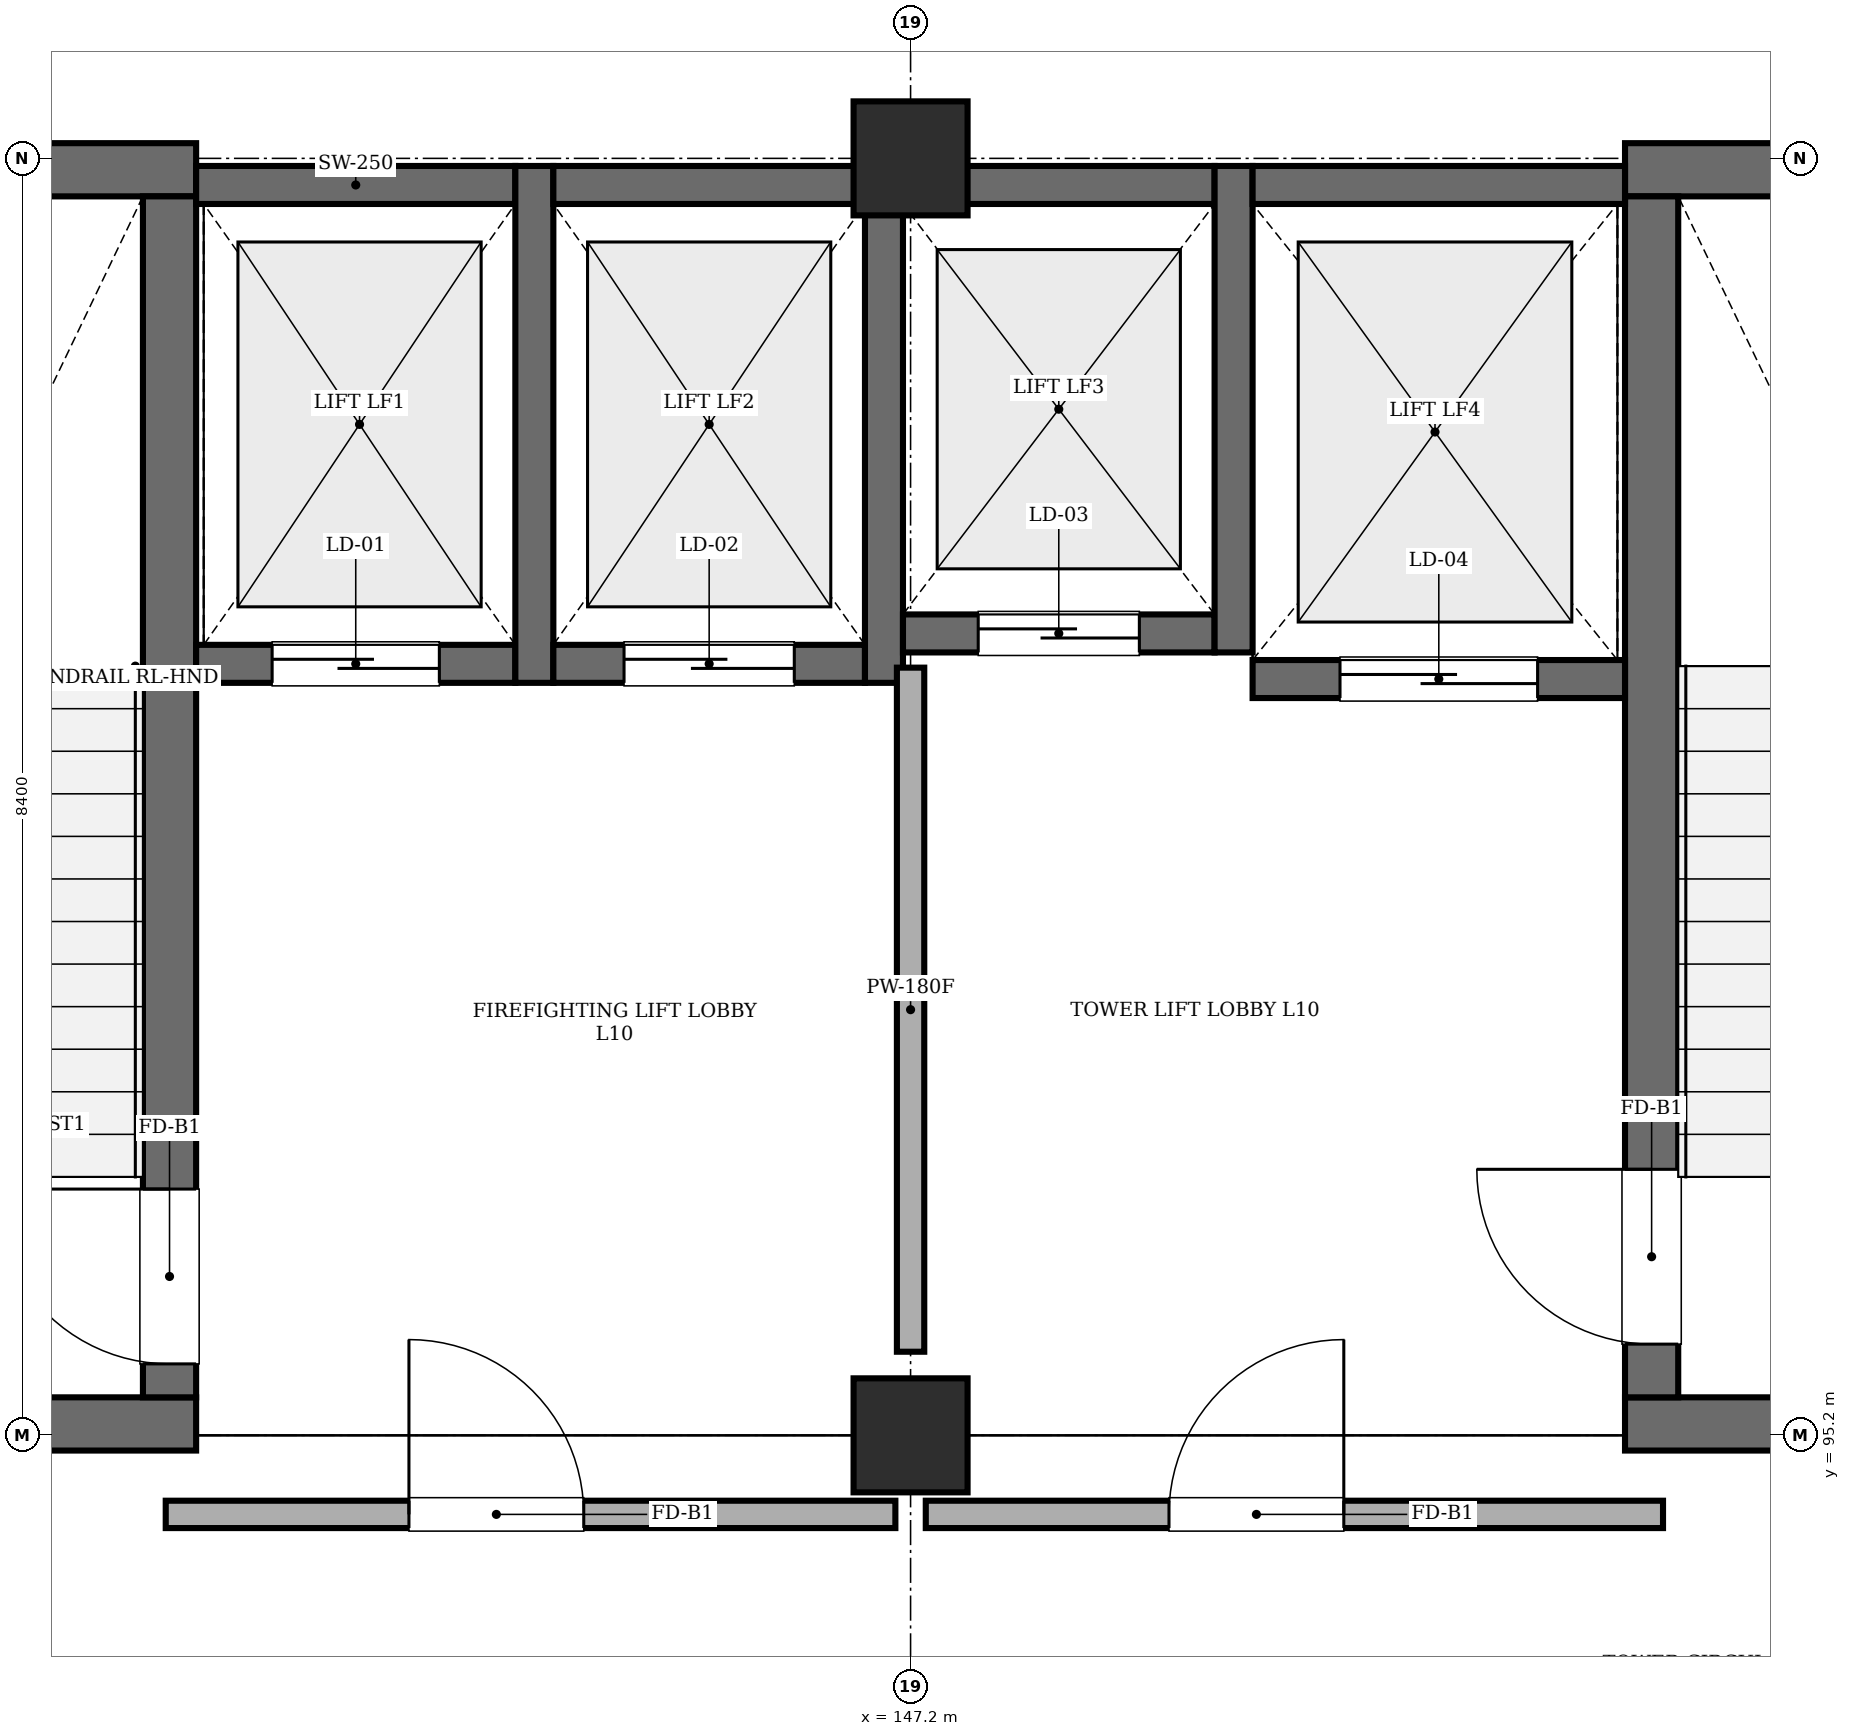
"""IFC4 building model, lengths in metres.
Left out: names, types, materials, properties, quantities, classifications, styles, units other than length and angle.
Written with IfcOpenShell. Run it as: python <this file> out.ifc"""

import sys

from ifc_helpers import new_model, si_unit, direction, frame, frame_2d, origin, origin_2d, place, context, subcontext, project, spatial, rectangle, extrude, element, fill, save


model = new_model("IFC4")
c1 = context("Model", 3, precision=1e-05, world=origin(), true_north=direction((0.0, 1.0)))
c2 = subcontext(c1, "Body", "Model", "MODEL_VIEW")
j1 = project(units=[si_unit("LENGTHUNIT", "METRE"), si_unit("PLANEANGLEUNIT", "RADIAN")], contexts=[c1])
p1 = place(None, origin())
s1 = spatial("IfcSite", under=j1, at=p1, CompositionType="ELEMENT")
p2 = place(p1, origin())
s2 = spatial("IfcBuilding", under=s1, at=p2, CompositionType="ELEMENT")
p3 = place(p2, frame((0.0, 0.0, 40.2)))
s3 = spatial("IfcBuildingStorey", under=s2, at=p3, CompositionType="ELEMENT", Elevation=40.2)
for number, where, z_axis, x_axis in (
    (1, (147.2, 95.2, 0.0), (0.0, 0.0, 1.0), (1.0, 0.0, 0.0)),
    (2, (147.2, 103.6, 0.0), (0.0, 0.0, 1.0), (1.0, 0.0, 0.0)),
):
    element("IfcColumn", number, at=place(p3, frame(where, z_axis=z_axis, x_axis=x_axis)), inside=s3, PredefinedType="COLUMN", context=c2, shape_type="SweptSolid", body=[
        extrude(rectangle(XDim=0.75, YDim=0.75, at=origin_2d()), origin(), (0.0, 0.0, 1.0), 4.0),
    ])
for number, where, z_axis, x_axis in (
    (3, (138.7, 95.275, 0.0), (0.0, 0.0, 1.0), (1.0, 0.0, 0.0)),
    (4, (138.7, 103.525, 0.0), (0.0, 0.0, 1.0), (1.0, 0.0, 0.0)),
):
    element("IfcWall", number, at=place(p3, frame(where, z_axis=z_axis, x_axis=x_axis)), inside=s3, PredefinedType="SHEAR", context=c2, shape_type="SweptSolid", body=[
        extrude(rectangle(XDim=3.8, YDim=0.35, at=frame_2d((1.9, 0.0))), origin(), (0.0, 0.0, 1.0), 4.0),
    ])
p4 = place(p3, frame((142.325, 95.45, 0.0), z_axis=(0.0, 0.0, 1.0), x_axis=(0.0, 1.0, 0.0)))
e5 = element("IfcWall", 5, at=p4, inside=s3, PredefinedType="SHEAR", context=c2, shape_type="SweptSolid", body=[
    extrude(rectangle(XDim=7.9, YDim=0.35, at=frame_2d((3.95, 0.0))), origin(), (0.0, 0.0, 1.0), 4.0),
])
p5 = place(p4, frame((0.22, 0.0, 0.0)))
e6 = element("IfcOpeningElement", 6, at=p5, cuts=e5, PredefinedType="OPENING", context=c2, shape_type="SweptSolid", body=[
    extrude(rectangle(XDim=1.15, YDim=2.15, at=frame_2d((0.575, 1.075))), frame((0.0, 0.185, 0.0), z_axis=(0.0, -1.0, 0.0), x_axis=(1.0, 0.0, 0.0)), (0.0, 0.0, 1.0), 0.37),
])
for number, where, z_axis, x_axis in (
    (7, (151.9, 95.275, 0.0), (0.0, 0.0, 1.0), (1.0, 0.0, 0.0)),
    (8, (151.9, 103.525, 0.0), (0.0, 0.0, 1.0), (1.0, 0.0, 0.0)),
):
    element("IfcWall", number, at=place(p3, frame(where, z_axis=z_axis, x_axis=x_axis)), inside=s3, PredefinedType="SHEAR", context=c2, shape_type="SweptSolid", body=[
        extrude(rectangle(XDim=3.8, YDim=0.35, at=frame_2d((1.9, 0.0))), origin(), (0.0, 0.0, 1.0), 4.0),
    ])
p6 = place(p3, frame((152.075, 95.45, 0.0), z_axis=(0.0, 0.0, 1.0), x_axis=(0.0, 1.0, 0.0)))
e9 = element("IfcWall", 9, at=p6, inside=s3, PredefinedType="SHEAR", context=c2, shape_type="SweptSolid", body=[
    extrude(rectangle(XDim=7.9, YDim=0.35, at=frame_2d((3.95, 0.0))), origin(), (0.0, 0.0, 1.0), 4.0),
])
p7 = place(p6, frame((0.35, 0.0, 0.0)))
e10 = element("IfcOpeningElement", 10, at=p7, cuts=e9, PredefinedType="OPENING", context=c2, shape_type="SweptSolid", body=[
    extrude(rectangle(XDim=1.15, YDim=2.15, at=frame_2d((0.575, 1.075))), frame((0.0, 0.185, 0.0), z_axis=(0.0, -1.0, 0.0), x_axis=(1.0, 0.0, 0.0)), (0.0, 0.0, 1.0), 0.37),
])
p8 = place(p3, frame((142.5, 100.275, 0.0), z_axis=(0.0, 0.0, 1.0), x_axis=(1.0, 0.0, 0.0)))
e11 = element("IfcWall", 11, at=p8, inside=s3, PredefinedType="SHEAR", context=c2, shape_type="SweptSolid", body=[
    extrude(rectangle(XDim=2.1, YDim=0.25, at=frame_2d((1.05, 0.0))), origin(), (0.0, 0.0, 1.0), 4.0),
])
p9 = place(p8, frame((0.5, 0.0, 0.0)))
e12 = element("IfcOpeningElement", 12, at=p9, cuts=e11, PredefinedType="OPENING", context=c2, shape_type="SweptSolid", body=[
    extrude(rectangle(XDim=1.1, YDim=2.15, at=frame_2d((0.55, 1.075))), frame((0.0, 0.135, 0.0), z_axis=(0.0, -1.0, 0.0), x_axis=(1.0, 0.0, 0.0)), (0.0, 0.0, 1.0), 0.27),
])
p10 = place(p3, frame((142.5, 103.425, 0.0), z_axis=(0.0, 0.0, 1.0), x_axis=(1.0, 0.0, 0.0)))
e13 = element("IfcWall", 13, at=p10, inside=s3, PredefinedType="SHEAR", context=c2, shape_type="SweptSolid", body=[
    extrude(rectangle(XDim=2.1, YDim=0.25, at=frame_2d((1.05, 0.0))), origin(), (0.0, 0.0, 1.0), 4.0),
])
p11 = place(p3, frame((144.725, 100.15, 0.0), z_axis=(0.0, 0.0, 1.0), x_axis=(0.0, 1.0, 0.0)))
e14 = element("IfcWall", 14, at=p11, inside=s3, PredefinedType="SHEAR", context=c2, shape_type="SweptSolid", body=[
    extrude(rectangle(XDim=3.4, YDim=0.25, at=frame_2d((1.7, 0.0))), origin(), (0.0, 0.0, 1.0), 4.0),
])
p12 = place(p3, frame((144.85, 100.275, 0.0), z_axis=(0.0, 0.0, 1.0), x_axis=(1.0, 0.0, 0.0)))
e15 = element("IfcWall", 15, at=p12, inside=s3, PredefinedType="SHEAR", context=c2, shape_type="SweptSolid", body=[
    extrude(rectangle(XDim=2.05, YDim=0.25, at=frame_2d((1.025, 0.0))), origin(), (0.0, 0.0, 1.0), 4.0),
])
p13 = place(p12, frame((0.465, 0.0, 0.0)))
e16 = element("IfcOpeningElement", 16, at=p13, cuts=e15, PredefinedType="OPENING", context=c2, shape_type="SweptSolid", body=[
    extrude(rectangle(XDim=1.12, YDim=2.15, at=frame_2d((0.56, 1.075))), frame((0.0, 0.135, 0.0), z_axis=(0.0, -1.0, 0.0), x_axis=(1.0, 0.0, 0.0)), (0.0, 0.0, 1.0), 0.27),
])
p14 = place(p3, frame((144.85, 103.425, 0.0), z_axis=(0.0, 0.0, 1.0), x_axis=(1.0, 0.0, 0.0)))
e17 = element("IfcWall", 17, at=p14, inside=s3, PredefinedType="SHEAR", context=c2, shape_type="SweptSolid", body=[
    extrude(rectangle(XDim=2.05, YDim=0.25, at=frame_2d((1.025, 0.0))), origin(), (0.0, 0.0, 1.0), 4.0),
])
p15 = place(p3, frame((147.025, 100.15, 0.0), z_axis=(0.0, 0.0, 1.0), x_axis=(0.0, 1.0, 0.0)))
e18 = element("IfcWall", 18, at=p15, inside=s3, PredefinedType="SHEAR", context=c2, shape_type="SweptSolid", body=[
    extrude(rectangle(XDim=3.4, YDim=0.25, at=frame_2d((1.7, 0.0))), origin(), (0.0, 0.0, 1.0), 4.0),
])
p16 = place(p3, frame((147.15, 100.475, 0.0), z_axis=(0.0, 0.0, 1.0), x_axis=(1.0, 0.0, 0.0)))
e19 = element("IfcWall", 19, at=p16, inside=s3, PredefinedType="SHEAR", context=c2, shape_type="SweptSolid", body=[
    extrude(rectangle(XDim=2.05, YDim=0.25, at=frame_2d((1.025, 0.0))), origin(), (0.0, 0.0, 1.0), 4.0),
])
p17 = place(p16, frame((0.495, 0.0, 0.0)))
e20 = element("IfcOpeningElement", 20, at=p17, cuts=e19, PredefinedType="OPENING", context=c2, shape_type="SweptSolid", body=[
    extrude(rectangle(XDim=1.06, YDim=2.15, at=frame_2d((0.53, 1.075))), frame((0.0, 0.135, 0.0), z_axis=(0.0, -1.0, 0.0), x_axis=(1.0, 0.0, 0.0)), (0.0, 0.0, 1.0), 0.27),
])
p18 = place(p3, frame((147.15, 103.425, 0.0), z_axis=(0.0, 0.0, 1.0), x_axis=(1.0, 0.0, 0.0)))
e21 = element("IfcWall", 21, at=p18, inside=s3, PredefinedType="SHEAR", context=c2, shape_type="SweptSolid", body=[
    extrude(rectangle(XDim=2.05, YDim=0.25, at=frame_2d((1.025, 0.0))), origin(), (0.0, 0.0, 1.0), 4.0),
])
p19 = place(p3, frame((149.325, 100.35, 0.0), z_axis=(0.0, 0.0, 1.0), x_axis=(0.0, 1.0, 0.0)))
e22 = element("IfcWall", 22, at=p19, inside=s3, PredefinedType="SHEAR", context=c2, shape_type="SweptSolid", body=[
    extrude(rectangle(XDim=3.2, YDim=0.25, at=frame_2d((1.6, 0.0))), origin(), (0.0, 0.0, 1.0), 4.0),
])
p20 = place(p3, frame((149.45, 100.175, 0.0), z_axis=(0.0, 0.0, 1.0), x_axis=(1.0, 0.0, 0.0)))
e23 = element("IfcWall", 23, at=p20, inside=s3, PredefinedType="SHEAR", context=c2, shape_type="SweptSolid", body=[
    extrude(rectangle(XDim=2.45, YDim=0.25, at=frame_2d((1.225, 0.0))), origin(), (0.0, 0.0, 1.0), 4.0),
])
p21 = place(p20, frame((0.575, 0.0, 0.0)))
e24 = element("IfcOpeningElement", 24, at=p21, cuts=e23, PredefinedType="OPENING", context=c2, shape_type="SweptSolid", body=[
    extrude(rectangle(XDim=1.3, YDim=2.25, at=frame_2d((0.65, 1.125))), frame((0.0, 0.135, 0.0), z_axis=(0.0, -1.0, 0.0), x_axis=(1.0, 0.0, 0.0)), (0.0, 0.0, 1.0), 0.27),
])
p22 = place(p3, frame((149.45, 103.425, 0.0), z_axis=(0.0, 0.0, 1.0), x_axis=(1.0, 0.0, 0.0)))
e25 = element("IfcWall", 25, at=p22, inside=s3, PredefinedType="SHEAR", context=c2, shape_type="SweptSolid", body=[
    extrude(rectangle(XDim=2.45, YDim=0.25, at=frame_2d((1.225, 0.0))), origin(), (0.0, 0.0, 1.0), 4.0),
])
p23 = place(p3, frame((142.3, 94.68, 0.0), z_axis=(0.0, 0.0, 1.0), x_axis=(1.0, 0.0, 0.0)))
e26 = element("IfcWall", 26, at=p23, inside=s3, PredefinedType="STANDARD", context=c2, shape_type="SweptSolid", body=[
    extrude(rectangle(XDim=4.8, YDim=0.18, at=frame_2d((2.4, 0.0))), origin(), (0.0, 0.0, 1.0), 4.0),
])
p24 = place(p23, frame((1.6, 0.0, 0.0)))
e27 = element("IfcOpeningElement", 27, at=p24, cuts=e26, PredefinedType="OPENING", context=c2, shape_type="SweptSolid", body=[
    extrude(rectangle(XDim=1.15, YDim=2.15, at=frame_2d((0.575, 1.075))), frame((0.0, 0.1, 0.0), z_axis=(0.0, -1.0, 0.0), x_axis=(1.0, 0.0, 0.0)), (0.0, 0.0, 1.0), 0.2),
])
p25 = place(p3, frame((147.3, 94.68, 0.0), z_axis=(0.0, 0.0, 1.0), x_axis=(1.0, 0.0, 0.0)))
e28 = element("IfcWall", 28, at=p25, inside=s3, PredefinedType="STANDARD", context=c2, shape_type="SweptSolid", body=[
    extrude(rectangle(XDim=4.85, YDim=0.18, at=frame_2d((2.425, 0.0))), origin(), (0.0, 0.0, 1.0), 4.0),
])
p26 = place(p25, frame((1.6, 0.0, 0.0)))
e29 = element("IfcOpeningElement", 29, at=p26, cuts=e28, PredefinedType="OPENING", context=c2, shape_type="SweptSolid", body=[
    extrude(rectangle(XDim=1.15, YDim=2.15, at=frame_2d((0.575, 1.075))), frame((0.0, 0.1, 0.0), z_axis=(0.0, -1.0, 0.0), x_axis=(1.0, 0.0, 0.0)), (0.0, 0.0, 1.0), 0.2),
])
p27 = place(p3, frame((147.2, 95.75, 0.0), z_axis=(0.0, 0.0, 1.0), x_axis=(0.0, 1.0, 0.0)))
e30 = element("IfcWall", 30, at=p27, inside=s3, PredefinedType="STANDARD", context=c2, shape_type="SweptSolid", body=[
    extrude(rectangle(XDim=4.5, YDim=0.18, at=frame_2d((2.25, 0.0))), origin(), (0.0, 0.0, 1.0), 3.3),
])
p28 = place(p24, origin())
e31 = element("IfcDoor", 31, at=p28, inside=s3, OperationType="SINGLE_SWING_LEFT", PredefinedType="DOOR", context=c2, shape_type="SweptSolid", body=[
    extrude(rectangle(XDim=1.15, YDim=2.15, at=frame_2d((0.575, 1.075))), frame((0.0, 0.025, 0.0), z_axis=(0.0, -1.0, 0.0), x_axis=(1.0, 0.0, 0.0)), (0.0, 0.0, 1.0), 0.05),
])
fill(e27, e31)
p29 = place(p26, origin())
e32 = element("IfcDoor", 32, at=p29, inside=s3, OperationType="SINGLE_SWING_RIGHT", PredefinedType="DOOR", context=c2, shape_type="SweptSolid", body=[
    extrude(rectangle(XDim=1.15, YDim=2.15, at=frame_2d((0.575, 1.075))), frame((0.0, 0.025, 0.0), z_axis=(0.0, -1.0, 0.0), x_axis=(1.0, 0.0, 0.0)), (0.0, 0.0, 1.0), 0.05),
])
fill(e29, e32)
p30 = place(p5, origin())
e33 = element("IfcDoor", 33, at=p30, inside=s3, OperationType="SINGLE_SWING_RIGHT", PredefinedType="DOOR", context=c2, shape_type="SweptSolid", body=[
    extrude(rectangle(XDim=1.15, YDim=2.15, at=frame_2d((0.575, 1.075))), frame((0.0, 0.025, 0.0), z_axis=(0.0, -1.0, 0.0), x_axis=(1.0, 0.0, 0.0)), (0.0, 0.0, 1.0), 0.05),
])
fill(e6, e33)
p31 = place(p7, origin())
e34 = element("IfcDoor", 34, at=p31, inside=s3, OperationType="SINGLE_SWING_RIGHT", PredefinedType="DOOR", context=c2, shape_type="SweptSolid", body=[
    extrude(rectangle(XDim=1.15, YDim=2.15, at=frame_2d((0.575, 1.075))), frame((0.0, 0.025, 0.0), z_axis=(0.0, -1.0, 0.0), x_axis=(1.0, 0.0, 0.0)), (0.0, 0.0, 1.0), 0.05),
])
fill(e10, e34)
p32 = place(p9, origin())
e35 = element("IfcDoor", 35, at=p32, inside=s3, OperationType="SLIDING_TO_LEFT", PredefinedType="DOOR", context=c2, shape_type="SweptSolid", body=[
    extrude(rectangle(XDim=1.1, YDim=2.15, at=frame_2d((0.55, 1.075))), frame((0.0, 0.025, 0.0), z_axis=(0.0, -1.0, 0.0), x_axis=(1.0, 0.0, 0.0)), (0.0, 0.0, 1.0), 0.05),
])
fill(e12, e35)
p33 = place(p13, origin())
e36 = element("IfcDoor", 36, at=p33, inside=s3, OperationType="SLIDING_TO_LEFT", PredefinedType="DOOR", context=c2, shape_type="SweptSolid", body=[
    extrude(rectangle(XDim=1.12, YDim=2.15, at=frame_2d((0.56, 1.075))), frame((0.0, 0.025, 0.0), z_axis=(0.0, -1.0, 0.0), x_axis=(1.0, 0.0, 0.0)), (0.0, 0.0, 1.0), 0.05),
])
fill(e16, e36)
p34 = place(p17, origin())
e37 = element("IfcDoor", 37, at=p34, inside=s3, OperationType="SLIDING_TO_LEFT", PredefinedType="DOOR", context=c2, shape_type="SweptSolid", body=[
    extrude(rectangle(XDim=1.06, YDim=2.15, at=frame_2d((0.53, 1.075))), frame((0.0, 0.025, 0.0), z_axis=(0.0, -1.0, 0.0), x_axis=(1.0, 0.0, 0.0)), (0.0, 0.0, 1.0), 0.05),
])
fill(e20, e37)
p35 = place(p21, origin())
e38 = element("IfcDoor", 38, at=p35, inside=s3, OperationType="SLIDING_TO_LEFT", PredefinedType="DOOR", context=c2, shape_type="SweptSolid", body=[
    extrude(rectangle(XDim=1.3, YDim=2.25, at=frame_2d((0.65, 1.125))), frame((0.0, 0.025, 0.0), z_axis=(0.0, -1.0, 0.0), x_axis=(1.0, 0.0, 0.0)), (0.0, 0.0, 1.0), 0.05),
])
fill(e24, e38)
save(model, sys.argv[1])
